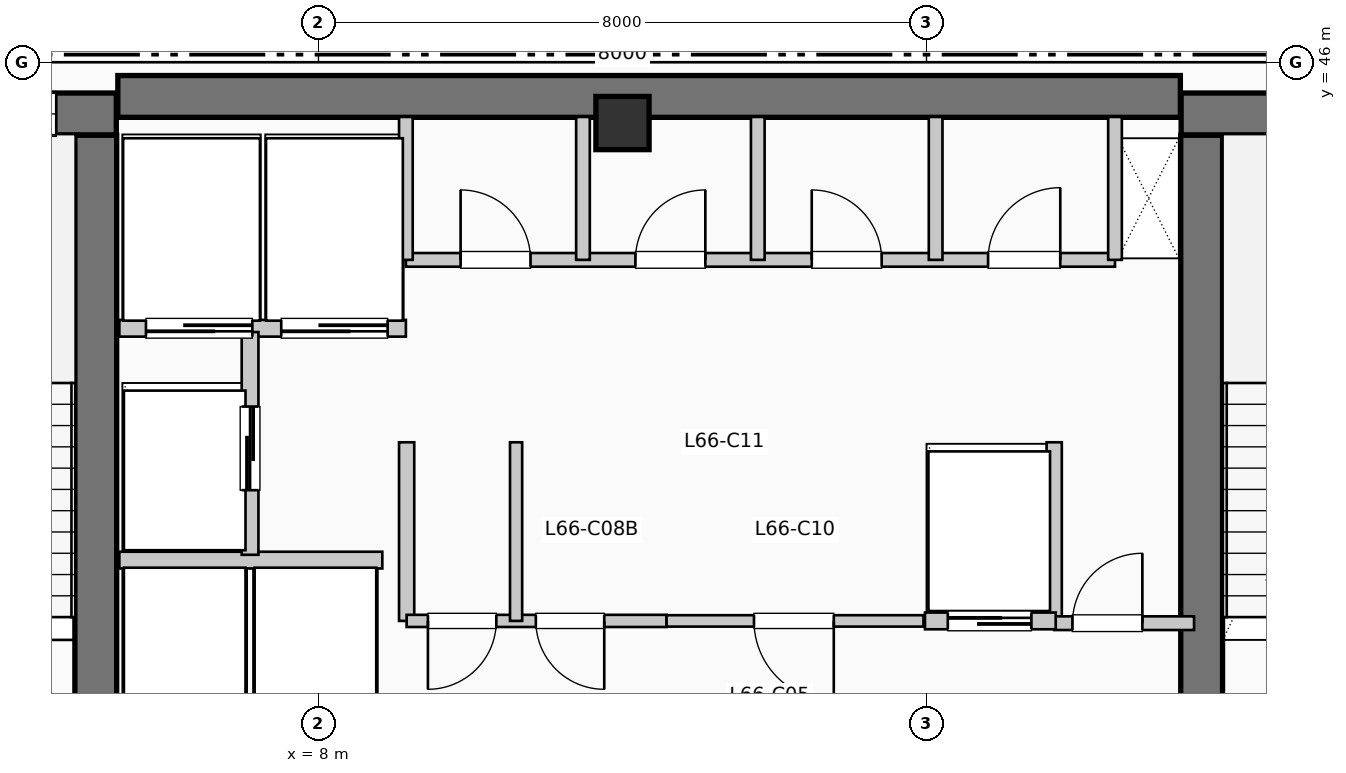
"""IFC4 building model, lengths in metres.
Left out: names, types, materials, properties, quantities, classifications, styles, units other than length and angle.
Written with IfcOpenShell. Run it as: python <this file> out.ifc"""

import sys

from ifc_helpers import new_model, si_unit, direction, frame, frame_2d, origin, origin_2d, place, context, subcontext, project, spatial, rectangle, extrude, element, fill, save


model = new_model("IFC4")
c1 = context("Model", 3, precision=1e-05, world=origin(), true_north=direction((0.0, 1.0)))
c2 = subcontext(c1, "Body", "Model", "MODEL_VIEW")
j1 = project(units=[si_unit("LENGTHUNIT", "METRE"), si_unit("PLANEANGLEUNIT", "RADIAN")], contexts=[c1])
p1 = place(None, origin())
s1 = spatial("IfcSite", under=j1, at=p1, CompositionType="ELEMENT")
p2 = place(p1, origin())
s2 = spatial("IfcBuilding", under=s1, at=p2, CompositionType="ELEMENT")
p3 = place(p2, frame((0.0, 0.0, 272.25)))
s3 = spatial("IfcBuildingStorey", under=s2, at=p3, CompositionType="ELEMENT", Elevation=272.25)
p4 = place(p3, frame((5.36, 45.55, 0.0), z_axis=(0.0, 0.0, 1.0), x_axis=(1.0, 0.0, 0.0)))
e1 = element("IfcWall", 1, at=p4, inside=s3, PredefinedType="SHEAR", context=c2, shape_type="SweptSolid", body=[
    extrude(rectangle(XDim=13.98, YDim=0.55, at=frame_2d((6.99, 0.0))), origin(), (0.0, 0.0, 1.0), 3.96),
])
p5 = place(p3, frame((5.07, 37.15, 0.0), z_axis=(0.0, 0.0, 1.0), x_axis=(0.0, 1.0, 0.0)))
e2 = element("IfcWall", 2, at=p5, inside=s3, PredefinedType="SHEAR", context=c2, shape_type="SweptSolid", body=[
    extrude(rectangle(XDim=7.89, YDim=0.55, at=frame_2d((3.945, 0.0))), origin(), (0.0, 0.0, 1.0), 3.96),
])
p6 = place(p3, frame((1.1, 45.32, 0.0), z_axis=(0.0, 0.0, 1.0), x_axis=(1.0, 0.0, 0.0)))
e3 = element("IfcWall", 3, at=p6, inside=s3, PredefinedType="SHEAR", context=c2, shape_type="SweptSolid", body=[
    extrude(rectangle(XDim=4.24, YDim=0.55, at=frame_2d((2.12, 0.0))), origin(), (0.0, 0.0, 1.0), 3.96),
])
p7 = place(p6, frame((2.05, 0.0, 1.05)))
e4 = element("IfcOpeningElement", 4, at=p7, cuts=e3, PredefinedType="OPENING", context=c2, shape_type="SweptSolid", body=[
    extrude(rectangle(XDim=1.4, YDim=1.8, at=frame_2d((0.7, 0.9))), frame((0.0, 0.285, 0.0), z_axis=(0.0, -1.0, 0.0), x_axis=(1.0, 0.0, 0.0)), (0.0, 0.0, 1.0), 0.57),
])
p8 = place(p3, frame((19.62, 37.15, 0.0), z_axis=(0.0, 0.0, 1.0), x_axis=(0.0, 1.0, 0.0)))
e5 = element("IfcWall", 5, at=p8, inside=s3, PredefinedType="SHEAR", context=c2, shape_type="SweptSolid", body=[
    extrude(rectangle(XDim=7.89, YDim=0.55, at=frame_2d((3.945, 0.0))), origin(), (0.0, 0.0, 1.0), 3.96),
])
p9 = place(p3, frame((19.35, 45.32, 0.0), z_axis=(0.0, 0.0, 1.0), x_axis=(1.0, 0.0, 0.0)))
e6 = element("IfcWall", 6, at=p9, inside=s3, PredefinedType="SHEAR", context=c2, shape_type="SweptSolid", body=[
    extrude(rectangle(XDim=3.69, YDim=0.55, at=frame_2d((1.845, 0.0))), origin(), (0.0, 0.0, 1.0), 3.96),
])
p10 = place(p9, frame((1.15, 0.0, 1.05)))
e7 = element("IfcOpeningElement", 7, at=p10, cuts=e6, PredefinedType="OPENING", context=c2, shape_type="SweptSolid", body=[
    extrude(rectangle(XDim=1.4, YDim=1.8, at=frame_2d((0.7, 0.9))), frame((0.0, 0.285, 0.0), z_axis=(0.0, -1.0, 0.0), x_axis=(1.0, 0.0, 0.0)), (0.0, 0.0, 1.0), 0.57),
])
p11 = place(p3, frame((12.0, 45.2, 0.0), z_axis=(0.0, 0.0, 1.0), x_axis=(1.0, 0.0, 0.0)))
e8 = element("IfcColumn", 8, at=p11, inside=s3, PredefinedType="COLUMN", context=c2, shape_type="SweptSolid", body=[
    extrude(rectangle(XDim=0.7, YDim=0.7, at=origin_2d()), origin(), (0.0, 0.0, 1.0), 3.96),
])
p12 = place(p3, frame((5.38, 39.45, 0.0), z_axis=(0.0, 0.0, 1.0), x_axis=(1.0, 0.0, 0.0)))
e9 = element("IfcWall", 9, at=p12, inside=s3, PredefinedType="PARTITIONING", context=c2, shape_type="SweptSolid", body=[
    extrude(rectangle(XDim=3.46, YDim=0.22, at=frame_2d((1.73, 0.0))), origin(), (0.0, 0.0, 1.0), 3.74),
])
p13 = place(p3, frame((5.38, 42.5, 0.0), z_axis=(0.0, 0.0, 1.0), x_axis=(1.0, 0.0, 0.0)))
e10 = element("IfcWall", 10, at=p13, inside=s3, PredefinedType="PARTITIONING", context=c2, shape_type="SweptSolid", body=[
    extrude(rectangle(XDim=3.77, YDim=0.22, at=frame_2d((1.885, 0.0))), origin(), (0.0, 0.0, 1.0), 3.74),
])
p14 = place(p13, frame((1.75, 0.0, 0.0), z_axis=(0.0, 0.0, 1.0), x_axis=(-1.0, 0.0, 0.0)))
e11 = element("IfcOpeningElement", 11, at=p14, cuts=e10, PredefinedType="OPENING", context=c2, shape_type="SweptSolid", body=[
    extrude(rectangle(XDim=1.4, YDim=2.2, at=frame_2d((0.7, 1.1))), frame((0.0, 0.12, 0.0), z_axis=(0.0, -1.0, 0.0), x_axis=(1.0, 0.0, 0.0)), (0.0, 0.0, 1.0), 0.24),
])
p15 = place(p13, frame((3.53, 0.0, 0.0), z_axis=(0.0, 0.0, 1.0), x_axis=(-1.0, 0.0, 0.0)))
e12 = element("IfcOpeningElement", 12, at=p15, cuts=e10, PredefinedType="OPENING", context=c2, shape_type="SweptSolid", body=[
    extrude(rectangle(XDim=1.4, YDim=2.2, at=frame_2d((0.7, 1.1))), frame((0.0, 0.12, 0.0), z_axis=(0.0, -1.0, 0.0), x_axis=(1.0, 0.0, 0.0)), (0.0, 0.0, 1.0), 0.24),
])
p16 = place(p3, frame((7.1, 39.52, 0.0), z_axis=(0.0, 0.0, 1.0), x_axis=(0.0, 1.0, 0.0)))
e13 = element("IfcWall", 13, at=p16, inside=s3, PredefinedType="PARTITIONING", context=c2, shape_type="SweptSolid", body=[
    extrude(rectangle(XDim=2.93, YDim=0.22, at=frame_2d((1.465, 0.0))), origin(), (0.0, 0.0, 1.0), 3.74),
])
p17 = place(p16, frame((0.85, 0.0, 0.0)))
e14 = element("IfcOpeningElement", 14, at=p17, cuts=e13, PredefinedType="OPENING", context=c2, shape_type="SweptSolid", body=[
    extrude(rectangle(XDim=1.1, YDim=2.2, at=frame_2d((0.55, 1.1))), frame((0.0, 0.12, 0.0), z_axis=(0.0, -1.0, 0.0), x_axis=(1.0, 0.0, 0.0)), (0.0, 0.0, 1.0), 0.24),
])
for number, where, z_axis, x_axis in (
    (15, (9.16, 38.65, 0.0), (0.0, 0.0, 1.0), (0.0, 1.0, 0.0)),
    (16, (17.68, 38.65, 0.0), (0.0, 0.0, 1.0), (0.0, 1.0, 0.0)),
):
    element("IfcWall", number, at=place(p3, frame(where, z_axis=z_axis, x_axis=x_axis)), inside=s3, PredefinedType="PARTITIONING", context=c2, shape_type="SweptSolid", body=[
        extrude(rectangle(XDim=2.35, YDim=0.2, at=frame_2d((1.175, 0.0))), origin(), (0.0, 0.0, 1.0), 3.74),
    ])
p18 = place(p3, frame((17.68, 38.62, 0.0), z_axis=(0.0, 0.0, 1.0), x_axis=(1.0, 0.0, 0.0)))
e17 = element("IfcWall", 17, at=p18, inside=s3, PredefinedType="PARTITIONING", context=c2, shape_type="SweptSolid", body=[
    extrude(rectangle(XDim=1.84, YDim=0.18, at=frame_2d((0.92, 0.0))), origin(), (0.0, 0.0, 1.0), 3.74),
])
p19 = place(p18, frame((0.24, 0.0, 0.0)))
e18 = element("IfcOpeningElement", 18, at=p19, cuts=e17, PredefinedType="OPENING", context=c2, shape_type="SweptSolid", body=[
    extrude(rectangle(XDim=0.92, YDim=2.1, at=frame_2d((0.46, 1.05))), frame((0.0, 0.1, 0.0), z_axis=(0.0, -1.0, 0.0), x_axis=(1.0, 0.0, 0.0)), (0.0, 0.0, 1.0), 0.2),
])
p20 = place(p3, frame((9.16, 38.65, 0.0), z_axis=(0.0, 0.0, 1.0), x_axis=(1.0, 0.0, 0.0)))
e19 = element("IfcWall", 19, at=p20, inside=s3, PredefinedType="PARTITIONING", context=c2, shape_type="SweptSolid", body=[
    extrude(rectangle(XDim=3.42, YDim=0.16, at=frame_2d((1.71, 0.0))), origin(), (0.0, 0.0, 1.0), 3.74),
])
p21 = place(p20, frame((1.18, 0.0, 0.0), z_axis=(0.0, 0.0, 1.0), x_axis=(-1.0, 0.0, 0.0)))
e20 = element("IfcOpeningElement", 20, at=p21, cuts=e19, PredefinedType="OPENING", context=c2, shape_type="SweptSolid", body=[
    extrude(rectangle(XDim=0.9, YDim=2.15, at=frame_2d((0.45, 1.075))), frame((0.0, 0.09, 0.0), z_axis=(0.0, -1.0, 0.0), x_axis=(1.0, 0.0, 0.0)), (0.0, 0.0, 1.0), 0.18),
])
p22 = place(p20, frame((2.6, 0.0, 0.0), z_axis=(0.0, 0.0, 1.0), x_axis=(-1.0, 0.0, 0.0)))
e21 = element("IfcOpeningElement", 21, at=p22, cuts=e19, PredefinedType="OPENING", context=c2, shape_type="SweptSolid", body=[
    extrude(rectangle(XDim=0.9, YDim=2.15, at=frame_2d((0.45, 1.075))), frame((0.0, 0.09, 0.0), z_axis=(0.0, -1.0, 0.0), x_axis=(1.0, 0.0, 0.0)), (0.0, 0.0, 1.0), 0.18),
])
p23 = place(p3, frame((10.6, 38.65, 0.0), z_axis=(0.0, 0.0, 1.0), x_axis=(0.0, 1.0, 0.0)))
e22 = element("IfcWall", 22, at=p23, inside=s3, PredefinedType="PARTITIONING", context=c2, shape_type="SweptSolid", body=[
    extrude(rectangle(XDim=2.35, YDim=0.16, at=frame_2d((1.175, 0.0))), origin(), (0.0, 0.0, 1.0), 3.74),
])
p24 = place(p3, frame((12.58, 38.65, 0.0), z_axis=(0.0, 0.0, 1.0), x_axis=(1.0, 0.0, 0.0)))
e23 = element("IfcWall", 23, at=p24, inside=s3, PredefinedType="PARTITIONING", context=c2, shape_type="SweptSolid", body=[
    extrude(rectangle(XDim=3.38, YDim=0.15, at=frame_2d((1.69, 0.0))), origin(), (0.0, 0.0, 1.0), 3.74),
])
p25 = place(p24, frame((2.2, 0.0, 0.0), z_axis=(0.0, 0.0, 1.0), x_axis=(-1.0, 0.0, 0.0)))
e24 = element("IfcOpeningElement", 24, at=p25, cuts=e23, PredefinedType="OPENING", context=c2, shape_type="SweptSolid", body=[
    extrude(rectangle(XDim=1.05, YDim=2.15, at=frame_2d((0.525, 1.075))), frame((0.0, 0.085, 0.0), z_axis=(0.0, -1.0, 0.0), x_axis=(1.0, 0.0, 0.0)), (0.0, 0.0, 1.0), 0.17),
])
p26 = place(p3, frame((15.98, 38.65, 0.0), z_axis=(0.0, 0.0, 1.0), x_axis=(1.0, 0.0, 0.0)))
e25 = element("IfcWall", 25, at=p26, inside=s3, PredefinedType="PARTITIONING", context=c2, shape_type="SweptSolid", body=[
    extrude(rectangle(XDim=1.72, YDim=0.22, at=frame_2d((0.86, 0.0))), origin(), (0.0, 0.0, 1.0), 3.74),
])
p27 = place(p26, frame((0.3, 0.0, 0.0)))
e26 = element("IfcOpeningElement", 26, at=p27, cuts=e25, PredefinedType="OPENING", context=c2, shape_type="SweptSolid", body=[
    extrude(rectangle(XDim=1.1, YDim=2.2, at=frame_2d((0.55, 1.1))), frame((0.0, 0.12, 0.0), z_axis=(0.0, -1.0, 0.0), x_axis=(1.0, 0.0, 0.0)), (0.0, 0.0, 1.0), 0.24),
])
p28 = place(p3, frame((9.15, 43.4, 0.0), z_axis=(0.0, 0.0, 1.0), x_axis=(1.0, 0.0, 0.0)))
e27 = element("IfcWall", 27, at=p28, inside=s3, PredefinedType="PLUMBINGWALL", context=c2, shape_type="SweptSolid", body=[
    extrude(rectangle(XDim=9.33, YDim=0.18, at=frame_2d((4.665, 0.0))), origin(), (0.0, 0.0, 1.0), 3.74),
])
p29 = place(p28, frame((0.72, 0.0, 0.0)))
e28 = element("IfcOpeningElement", 28, at=p29, cuts=e27, PredefinedType="OPENING", context=c2, shape_type="SweptSolid", body=[
    extrude(rectangle(XDim=0.92, YDim=2.1, at=frame_2d((0.46, 1.05))), frame((0.0, 0.1, 0.0), z_axis=(0.0, -1.0, 0.0), x_axis=(1.0, 0.0, 0.0)), (0.0, 0.0, 1.0), 0.2),
])
p30 = place(p28, frame((3.02, 0.0, 0.0)))
e29 = element("IfcOpeningElement", 29, at=p30, cuts=e27, PredefinedType="OPENING", context=c2, shape_type="SweptSolid", body=[
    extrude(rectangle(XDim=0.92, YDim=2.1, at=frame_2d((0.46, 1.05))), frame((0.0, 0.1, 0.0), z_axis=(0.0, -1.0, 0.0), x_axis=(1.0, 0.0, 0.0)), (0.0, 0.0, 1.0), 0.2),
])
p31 = place(p28, frame((5.34, 0.0, 0.0)))
e30 = element("IfcOpeningElement", 30, at=p31, cuts=e27, PredefinedType="OPENING", context=c2, shape_type="SweptSolid", body=[
    extrude(rectangle(XDim=0.92, YDim=2.1, at=frame_2d((0.46, 1.05))), frame((0.0, 0.1, 0.0), z_axis=(0.0, -1.0, 0.0), x_axis=(1.0, 0.0, 0.0)), (0.0, 0.0, 1.0), 0.2),
])
p32 = place(p28, frame((7.66, 0.0, 0.0)))
e31 = element("IfcOpeningElement", 31, at=p32, cuts=e27, PredefinedType="OPENING", context=c2, shape_type="SweptSolid", body=[
    extrude(rectangle(XDim=0.95, YDim=2.1, at=frame_2d((0.475, 1.05))), frame((0.0, 0.1, 0.0), z_axis=(0.0, -1.0, 0.0), x_axis=(1.0, 0.0, 0.0)), (0.0, 0.0, 1.0), 0.2),
])
for number, where, z_axis, x_axis in (
    (32, (9.15, 43.4, 0.0), (0.0, 0.0, 1.0), (0.0, 1.0, 0.0)),
    (33, (18.48, 43.4, 0.0), (0.0, 0.0, 1.0), (0.0, 1.0, 0.0)),
    (34, (11.48, 43.4, 0.0), (0.0, 0.0, 1.0), (0.0, 1.0, 0.0)),
    (35, (13.78, 43.4, 0.0), (0.0, 0.0, 1.0), (0.0, 1.0, 0.0)),
    (36, (16.12, 43.4, 0.0), (0.0, 0.0, 1.0), (0.0, 1.0, 0.0)),
):
    element("IfcWall", number, at=place(p3, frame(where, z_axis=z_axis, x_axis=x_axis)), inside=s3, PredefinedType="PLUMBINGWALL", context=c2, shape_type="SweptSolid", body=[
        extrude(rectangle(XDim=1.88, YDim=0.18, at=frame_2d((0.94, 0.0))), origin(), (0.0, 0.0, 1.0), 3.74),
    ])
p33 = place(p7, origin())
e37 = element("IfcWindow", 37, at=p33, inside=s3, PartitioningType="SINGLE_PANEL", PredefinedType="WINDOW", context=c2, shape_type="SweptSolid", body=[
    extrude(rectangle(XDim=1.4, YDim=1.8, at=frame_2d((0.7, 0.9))), frame((0.0, 0.03, 0.0), z_axis=(0.0, -1.0, 0.0), x_axis=(1.0, 0.0, 0.0)), (0.0, 0.0, 1.0), 0.06),
])
fill(e4, e37)
p34 = place(p14, origin())
e38 = element("IfcDoor", 38, at=p34, inside=s3, OperationType="SLIDING_TO_LEFT", PredefinedType="DOOR", context=c2, shape_type="SweptSolid", body=[
    extrude(rectangle(XDim=1.4, YDim=2.2, at=frame_2d((0.7, 1.1))), frame((0.0, 0.025, 0.0), z_axis=(0.0, -1.0, 0.0), x_axis=(1.0, 0.0, 0.0)), (0.0, 0.0, 1.0), 0.05),
])
fill(e11, e38)
p35 = place(p15, origin())
e39 = element("IfcDoor", 39, at=p35, inside=s3, OperationType="SLIDING_TO_LEFT", PredefinedType="DOOR", context=c2, shape_type="SweptSolid", body=[
    extrude(rectangle(XDim=1.4, YDim=2.2, at=frame_2d((0.7, 1.1))), frame((0.0, 0.025, 0.0), z_axis=(0.0, -1.0, 0.0), x_axis=(1.0, 0.0, 0.0)), (0.0, 0.0, 1.0), 0.05),
])
fill(e12, e39)
p36 = place(p17, origin())
e40 = element("IfcDoor", 40, at=p36, inside=s3, OperationType="SLIDING_TO_LEFT", PredefinedType="DOOR", context=c2, shape_type="SweptSolid", body=[
    extrude(rectangle(XDim=1.1, YDim=2.2, at=frame_2d((0.55, 1.1))), frame((0.0, 0.025, 0.0), z_axis=(0.0, -1.0, 0.0), x_axis=(1.0, 0.0, 0.0)), (0.0, 0.0, 1.0), 0.05),
])
fill(e14, e40)
p37 = place(p19, origin())
e41 = element("IfcDoor", 41, at=p37, inside=s3, OperationType="SINGLE_SWING_RIGHT", PredefinedType="DOOR", context=c2, shape_type="SweptSolid", body=[
    extrude(rectangle(XDim=0.92, YDim=2.1, at=frame_2d((0.46, 1.05))), frame((0.0, 0.025, 0.0), z_axis=(0.0, -1.0, 0.0), x_axis=(1.0, 0.0, 0.0)), (0.0, 0.0, 1.0), 0.05),
])
fill(e18, e41)
p38 = place(p21, origin())
e42 = element("IfcDoor", 42, at=p38, inside=s3, OperationType="SINGLE_SWING_LEFT", PredefinedType="DOOR", context=c2, shape_type="SweptSolid", body=[
    extrude(rectangle(XDim=0.9, YDim=2.15, at=frame_2d((0.45, 1.075))), frame((0.0, 0.025, 0.0), z_axis=(0.0, -1.0, 0.0), x_axis=(1.0, 0.0, 0.0)), (0.0, 0.0, 1.0), 0.05),
])
fill(e20, e42)
p39 = place(p22, origin())
e43 = element("IfcDoor", 43, at=p39, inside=s3, OperationType="SINGLE_SWING_RIGHT", PredefinedType="DOOR", context=c2, shape_type="SweptSolid", body=[
    extrude(rectangle(XDim=0.9, YDim=2.15, at=frame_2d((0.45, 1.075))), frame((0.0, 0.025, 0.0), z_axis=(0.0, -1.0, 0.0), x_axis=(1.0, 0.0, 0.0)), (0.0, 0.0, 1.0), 0.05),
])
fill(e21, e43)
p40 = place(p25, origin())
e44 = element("IfcDoor", 44, at=p40, inside=s3, OperationType="SINGLE_SWING_RIGHT", PredefinedType="DOOR", context=c2, shape_type="SweptSolid", body=[
    extrude(rectangle(XDim=1.05, YDim=2.15, at=frame_2d((0.525, 1.075))), frame((0.0, 0.025, 0.0), z_axis=(0.0, -1.0, 0.0), x_axis=(1.0, 0.0, 0.0)), (0.0, 0.0, 1.0), 0.05),
])
fill(e24, e44)
p41 = place(p27, origin())
e45 = element("IfcDoor", 45, at=p41, inside=s3, OperationType="SLIDING_TO_LEFT", PredefinedType="DOOR", context=c2, shape_type="SweptSolid", body=[
    extrude(rectangle(XDim=1.1, YDim=2.2, at=frame_2d((0.55, 1.1))), frame((0.0, 0.025, 0.0), z_axis=(0.0, -1.0, 0.0), x_axis=(1.0, 0.0, 0.0)), (0.0, 0.0, 1.0), 0.05),
])
fill(e26, e45)
p42 = place(p29, origin())
e46 = element("IfcDoor", 46, at=p42, inside=s3, OperationType="SINGLE_SWING_LEFT", PredefinedType="DOOR", context=c2, shape_type="SweptSolid", body=[
    extrude(rectangle(XDim=0.92, YDim=2.1, at=frame_2d((0.46, 1.05))), frame((0.0, 0.025, 0.0), z_axis=(0.0, -1.0, 0.0), x_axis=(1.0, 0.0, 0.0)), (0.0, 0.0, 1.0), 0.05),
])
fill(e28, e46)
p43 = place(p30, origin())
e47 = element("IfcDoor", 47, at=p43, inside=s3, OperationType="SINGLE_SWING_RIGHT", PredefinedType="DOOR", context=c2, shape_type="SweptSolid", body=[
    extrude(rectangle(XDim=0.92, YDim=2.1, at=frame_2d((0.46, 1.05))), frame((0.0, 0.025, 0.0), z_axis=(0.0, -1.0, 0.0), x_axis=(1.0, 0.0, 0.0)), (0.0, 0.0, 1.0), 0.05),
])
fill(e29, e47)
p44 = place(p31, origin())
e48 = element("IfcDoor", 48, at=p44, inside=s3, OperationType="SINGLE_SWING_LEFT", PredefinedType="DOOR", context=c2, shape_type="SweptSolid", body=[
    extrude(rectangle(XDim=0.92, YDim=2.1, at=frame_2d((0.46, 1.05))), frame((0.0, 0.025, 0.0), z_axis=(0.0, -1.0, 0.0), x_axis=(1.0, 0.0, 0.0)), (0.0, 0.0, 1.0), 0.05),
])
fill(e30, e48)
p45 = place(p32, origin())
e49 = element("IfcDoor", 49, at=p45, inside=s3, OperationType="SINGLE_SWING_RIGHT", PredefinedType="DOOR", context=c2, shape_type="SweptSolid", body=[
    extrude(rectangle(XDim=0.95, YDim=2.1, at=frame_2d((0.475, 1.05))), frame((0.0, 0.025, 0.0), z_axis=(0.0, -1.0, 0.0), x_axis=(1.0, 0.0, 0.0)), (0.0, 0.0, 1.0), 0.05),
])
fill(e31, e49)
save(model, sys.argv[1])
